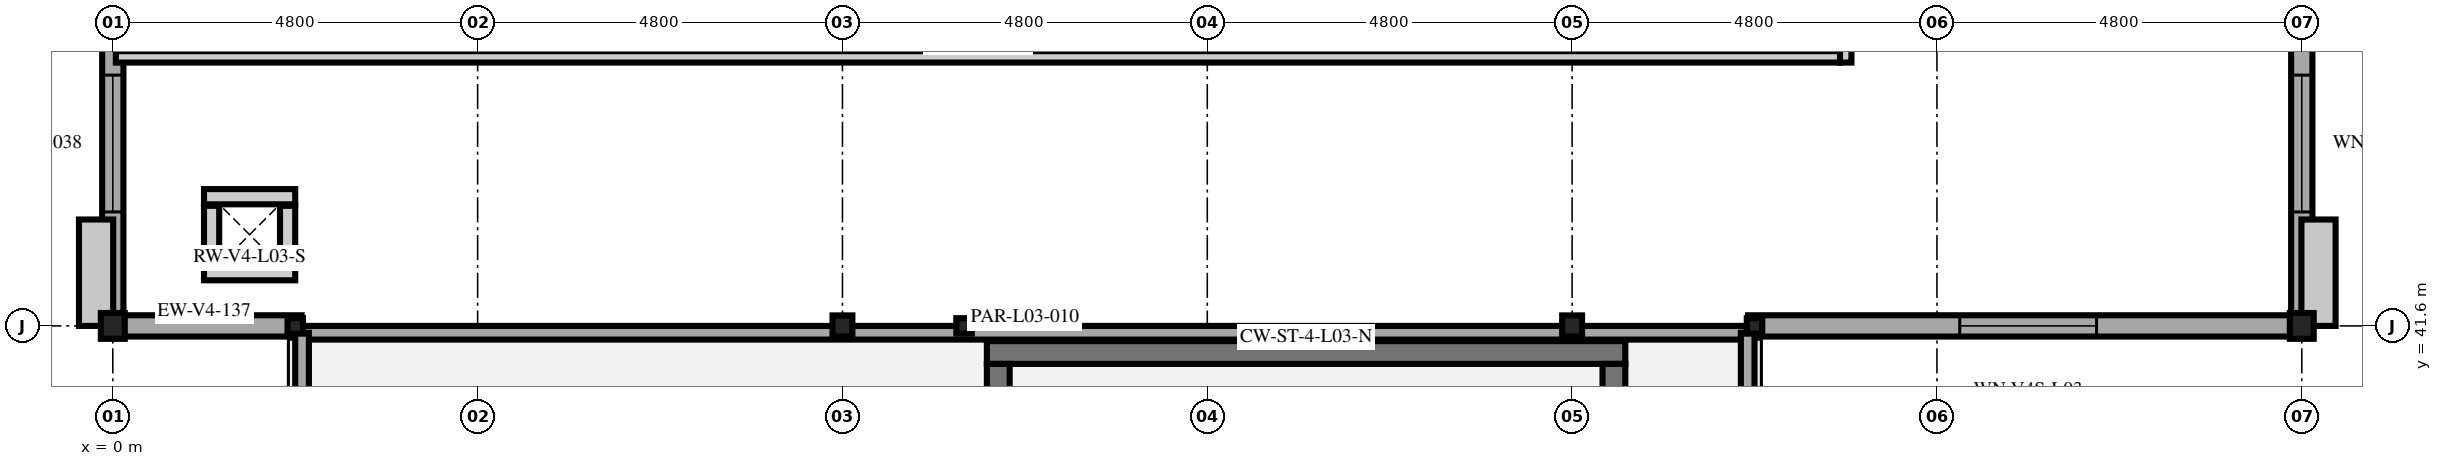
"""IFC4 building model, lengths in metres.
Left out: names, types, materials, properties, quantities, classifications, styles, units other than length and angle.
Written with IfcOpenShell. Run it as: python <this file> out.ifc"""

import sys

from ifc_helpers import new_model, si_unit, direction, frame, frame_2d, origin, origin_2d, place, context, subcontext, project, spatial, rectangle, i_section, extrude, element, fill, save


model = new_model("IFC4")
c1 = context("Model", 3, precision=1e-05, world=origin(), true_north=direction((0.0, 1.0)))
c2 = subcontext(c1, "Body", "Model", "MODEL_VIEW")
j1 = project(units=[si_unit("LENGTHUNIT", "METRE"), si_unit("PLANEANGLEUNIT", "RADIAN")], contexts=[c1])
p1 = place(None, origin())
s1 = spatial("IfcSite", under=j1, at=p1, CompositionType="ELEMENT")
p2 = place(p1, origin())
s2 = spatial("IfcBuilding", under=s1, at=p2, CompositionType="ELEMENT")
p3 = place(p2, frame((0.0, 0.0, 14.1)))
s3 = spatial("IfcBuildingStorey", under=s2, at=p3, CompositionType="ELEMENT", Elevation=14.1)
for number, where, z_axis, x_axis in (
    (1, (0.0, 41.6, 0.0), (0.0, 0.0, 1.0), (1.0, 0.0, 0.0)),
    (2, (28.8, 41.6, 0.0), (0.0, 0.0, 1.0), (1.0, 0.0, 0.0)),
):
    element("IfcColumn", number, at=place(p3, frame(where, z_axis=z_axis, x_axis=x_axis)), inside=s3, PredefinedType="COLUMN", context=c2, shape_type="SweptSolid", body=[
        extrude(i_section(OverallWidth=0.314, OverallDepth=0.34, WebThickness=0.019, FlangeThickness=0.031, at=origin_2d()), origin(), (0.0, 0.0, 1.0), 3.796),
    ])
for number, where, z_axis, x_axis in (
    (3, (9.6, 41.6, 0.0), (0.0, 0.0, 1.0), (1.0, 0.0, 0.0)),
    (4, (19.2, 41.6, 0.0), (0.0, 0.0, 1.0), (1.0, 0.0, 0.0)),
):
    element("IfcColumn", number, at=place(p3, frame(where, z_axis=z_axis, x_axis=x_axis)), inside=s3, PredefinedType="COLUMN", context=c2, shape_type="SweptSolid", body=[
        extrude(i_section(OverallWidth=0.261, OverallDepth=0.276, WebThickness=0.015, FlangeThickness=0.025, at=origin_2d()), origin(), (0.0, 0.0, 1.0), 3.796),
    ])
for number, where, z_axis, x_axis in (
    (5, (2.4, 41.6, 0.0), (0.0, 0.0, 1.0), (1.0, 0.0, 0.0)),
    (6, (11.2, 41.6, 0.0), (0.0, 0.0, 1.0), (1.0, 0.0, 0.0)),
    (7, (21.6, 41.6, 0.0), (0.0, 0.0, 1.0), (1.0, 0.0, 0.0)),
):
    element("IfcColumn", number, at=place(p3, frame(where, z_axis=z_axis, x_axis=x_axis)), inside=s3, PredefinedType="COLUMN", context=c2, shape_type="SweptSolid", body=[
        extrude(i_section(OverallWidth=0.204, OverallDepth=0.203, WebThickness=0.007, FlangeThickness=0.011, at=origin_2d()), origin(), (0.0, 0.0, 1.0), 2.63),
    ])
p4 = place(p3, frame((11.5, 41.25, 0.0), z_axis=(0.0, 0.0, 1.0), x_axis=(1.0, 0.0, 0.0)))
e8 = element("IfcWall", 8, at=p4, inside=s3, PredefinedType="SHEAR", context=c2, shape_type="SweptSolid", body=[
    extrude(rectangle(XDim=8.4, YDim=0.3, at=frame_2d((4.2, 0.0))), origin(), (0.0, 0.0, 1.0), 2.605),
])
p5 = place(p3, frame((11.65, 37.3, 0.0), z_axis=(0.0, 0.0, 1.0), x_axis=(0.0, 1.0, 0.0)))
e9 = element("IfcWall", 9, at=p5, inside=s3, PredefinedType="SHEAR", context=c2, shape_type="SweptSolid", body=[
    extrude(rectangle(XDim=3.8, YDim=0.3, at=frame_2d((1.9, 0.0))), origin(), (0.0, 0.0, 1.0), 2.605),
])
p6 = place(p5, frame((1.35, 0.0, 0.0)))
e10 = element("IfcOpeningElement", 10, at=p6, cuts=e9, PredefinedType="OPENING", context=c2, shape_type="SweptSolid", body=[
    extrude(rectangle(XDim=1.1, YDim=2.2, at=frame_2d((0.55, 1.1))), frame((0.0, 0.16, 0.0), z_axis=(0.0, -1.0, 0.0), x_axis=(1.0, 0.0, 0.0)), (0.0, 0.0, 1.0), 0.32),
])
p7 = place(p3, frame((19.75, 41.1, 0.0), z_axis=(0.0, 0.0, 1.0), x_axis=(0.0, -1.0, 0.0)))
e11 = element("IfcWall", 11, at=p7, inside=s3, PredefinedType="SHEAR", context=c2, shape_type="SweptSolid", body=[
    extrude(rectangle(XDim=3.8, YDim=0.3, at=frame_2d((1.9, 0.0))), origin(), (0.0, 0.0, 1.0), 2.605),
])
for number, where, z_axis, x_axis in (
    (12, (2.4, 42.3, 0.0), (0.0, 0.0, 1.0), (-1.0, 0.0, 0.0)),
    (13, (1.2, 43.3, 0.0), (0.0, 0.0, 1.0), (1.0, 0.0, 0.0)),
):
    element("IfcWall", number, at=place(p3, frame(where, z_axis=z_axis, x_axis=x_axis)), inside=s3, PredefinedType="PARTITIONING", context=c2, shape_type="SweptSolid", body=[
        extrude(rectangle(XDim=1.2, YDim=0.2, at=frame_2d((0.6, 0.0))), origin(), (0.0, 0.0, 1.0), 3.911),
    ])
for number, where, z_axis, x_axis in (
    (14, (1.3, 42.42, 0.0), (0.0, 0.0, 1.0), (0.0, 1.0, 0.0)),
    (15, (2.3, 43.18, 0.0), (0.0, 0.0, 1.0), (0.0, -1.0, 0.0)),
):
    element("IfcWall", number, at=place(p3, frame(where, z_axis=z_axis, x_axis=x_axis)), inside=s3, PredefinedType="PARTITIONING", context=c2, shape_type="SweptSolid", body=[
        extrude(rectangle(XDim=0.76, YDim=0.2, at=frame_2d((0.38, 0.0))), origin(), (0.0, 0.0, 1.0), 3.911),
    ])
p8 = place(p3, frame((2.485, 41.6, 0.0), z_axis=(0.0, 0.0, 1.0), x_axis=(-1.0, 0.0, 0.0)))
e16 = element("IfcWall", 16, at=p8, inside=s3, PredefinedType="SOLIDWALL", context=c2, shape_type="SweptSolid", body=[
    extrude(rectangle(XDim=2.57, YDim=0.28, at=frame_2d((1.285, 0.0))), origin(), (0.0, 0.0, 1.0), 3.482),
])
p9 = place(p3, frame((28.885, 41.6, 0.0), z_axis=(0.0, 0.0, 1.0), x_axis=(-1.0, 0.0, 0.0)))
e17 = element("IfcWall", 17, at=p9, inside=s3, PredefinedType="SOLIDWALL", context=c2, shape_type="SweptSolid", body=[
    extrude(rectangle(XDim=7.37, YDim=0.28, at=frame_2d((3.685, 0.0))), origin(), (0.0, 0.0, 1.0), 3.482),
])
p10 = place(p9, frame((2.785, 0.0, 1.0)))
e18 = element("IfcOpeningElement", 18, at=p10, cuts=e17, PredefinedType="OPENING", context=c2, shape_type="SweptSolid", body=[
    extrude(rectangle(XDim=1.8, YDim=2.1, at=frame_2d((0.9, 1.05))), frame((0.0, 0.15, 0.0), z_axis=(0.0, -1.0, 0.0), x_axis=(1.0, 0.0, 0.0)), (0.0, 0.0, 1.0), 0.3),
])
p11 = place(p3, frame((0.0, 41.515, 0.0), z_axis=(0.0, 0.0, 1.0), x_axis=(0.0, 1.0, 0.0)))
e19 = element("IfcWall", 19, at=p11, inside=s3, PredefinedType="SOLIDWALL", context=c2, shape_type="SweptSolid", body=[
    extrude(rectangle(XDim=4.97, YDim=0.28, at=frame_2d((2.485, 0.0))), origin(), (0.0, 0.0, 1.0), 3.482),
])
p12 = place(p11, frame((1.585, 0.0, 1.0)))
e20 = element("IfcOpeningElement", 20, at=p12, cuts=e19, PredefinedType="OPENING", context=c2, shape_type="SweptSolid", body=[
    extrude(rectangle(XDim=1.8, YDim=2.1, at=frame_2d((0.9, 1.05))), frame((0.0, 0.15, 0.0), z_axis=(0.0, -1.0, 0.0), x_axis=(1.0, 0.0, 0.0)), (0.0, 0.0, 1.0), 0.3),
])
p13 = place(p3, frame((28.8, 46.485, 0.0), z_axis=(0.0, 0.0, 1.0), x_axis=(0.0, -1.0, 0.0)))
e21 = element("IfcWall", 21, at=p13, inside=s3, PredefinedType="SOLIDWALL", context=c2, shape_type="SweptSolid", body=[
    extrude(rectangle(XDim=4.97, YDim=0.28, at=frame_2d((2.485, 0.0))), origin(), (0.0, 0.0, 1.0), 3.482),
])
p14 = place(p13, frame((1.585, 0.0, 1.0)))
e22 = element("IfcOpeningElement", 22, at=p14, cuts=e21, PredefinedType="OPENING", context=c2, shape_type="SweptSolid", body=[
    extrude(rectangle(XDim=1.8, YDim=2.1, at=frame_2d((0.9, 1.05))), frame((0.0, 0.15, 0.0), z_axis=(0.0, -1.0, 0.0), x_axis=(1.0, 0.0, 0.0)), (0.0, 0.0, 1.0), 0.3),
])
p15 = place(p3, frame((2.49, 41.51, 2.85), z_axis=(0.0, 0.0, 1.0), x_axis=(1.0, 0.0, 0.0)))
e23 = element("IfcWall", 23, at=p15, inside=s3, PredefinedType="PARAPET", context=c2, shape_type="SweptSolid", body=[
    extrude(rectangle(XDim=19.02, YDim=0.18, at=frame_2d((9.51, 0.0))), origin(), (0.0, 0.0, 1.0), 0.45),
])
for number, where, z_axis, x_axis in (
    (24, (2.49, 36.89, 2.85), (0.0, 0.0, 1.0), (0.0, 1.0, 0.0)),
    (25, (21.51, 41.51, 2.85), (0.0, 0.0, 1.0), (0.0, -1.0, 0.0)),
):
    element("IfcWall", number, at=place(p3, frame(where, z_axis=z_axis, x_axis=x_axis)), inside=s3, PredefinedType="PARAPET", context=c2, shape_type="SweptSolid", body=[
        extrude(rectangle(XDim=4.62, YDim=0.18, at=frame_2d((2.31, 0.0))), origin(), (0.0, 0.0, 1.0), 0.45),
    ])
p16 = place(p3, frame((0.04, 45.14, 0.0), z_axis=(0.0, 0.0, 1.0), x_axis=(1.0, 0.0, 0.0)))
e26 = element("IfcWall", 26, at=p16, inside=s3, PredefinedType="PARTITIONING", context=c2, shape_type="SweptSolid", body=[
    extrude(rectangle(XDim=22.685, YDim=0.15, at=frame_2d((11.343, 0.0))), origin(), (0.0, 0.0, 1.0), 3.475),
])
p17 = place(p3, frame((22.8, 45.065, 0.0), z_axis=(0.0, 0.0, 1.0), x_axis=(0.0, 1.0, 0.0)))
e27 = element("IfcWall", 27, at=p17, inside=s3, PredefinedType="PARTITIONING", context=c2, shape_type="SweptSolid", body=[
    extrude(rectangle(XDim=12.27, YDim=0.15, at=frame_2d((6.135, 0.0))), origin(), (0.0, 0.0, 1.0), 4.929),
])
p18 = place(p17, frame((5.66, 0.0, 0.0)))
e28 = element("IfcOpeningElement", 28, at=p18, cuts=e27, PredefinedType="OPENING", context=c2, shape_type="SweptSolid", body=[
    extrude(rectangle(XDim=0.95, YDim=2.15, at=frame_2d((0.475, 1.075))), frame((0.0, 0.085, 0.0), z_axis=(0.0, -1.0, 0.0), x_axis=(1.0, 0.0, 0.0)), (0.0, 0.0, 1.0), 0.17),
])
p19 = place(p10, origin())
e29 = element("IfcWindow", 29, at=p19, inside=s3, PartitioningType="SINGLE_PANEL", PredefinedType="WINDOW", context=c2, shape_type="SweptSolid", body=[
    extrude(rectangle(XDim=1.8, YDim=2.1, at=frame_2d((0.9, 1.05))), frame((0.0, 0.03, 0.0), z_axis=(0.0, -1.0, 0.0), x_axis=(1.0, 0.0, 0.0)), (0.0, 0.0, 1.0), 0.06),
])
fill(e18, e29)
p20 = place(p12, origin())
e30 = element("IfcWindow", 30, at=p20, inside=s3, PartitioningType="SINGLE_PANEL", PredefinedType="WINDOW", context=c2, shape_type="SweptSolid", body=[
    extrude(rectangle(XDim=1.8, YDim=2.1, at=frame_2d((0.9, 1.05))), frame((0.0, 0.03, 0.0), z_axis=(0.0, -1.0, 0.0), x_axis=(1.0, 0.0, 0.0)), (0.0, 0.0, 1.0), 0.06),
])
fill(e20, e30)
p21 = place(p14, origin())
e31 = element("IfcWindow", 31, at=p21, inside=s3, PartitioningType="SINGLE_PANEL", PredefinedType="WINDOW", context=c2, shape_type="SweptSolid", body=[
    extrude(rectangle(XDim=1.8, YDim=2.1, at=frame_2d((0.9, 1.05))), frame((0.0, 0.03, 0.0), z_axis=(0.0, -1.0, 0.0), x_axis=(1.0, 0.0, 0.0)), (0.0, 0.0, 1.0), 0.06),
])
fill(e22, e31)
save(model, sys.argv[1])
